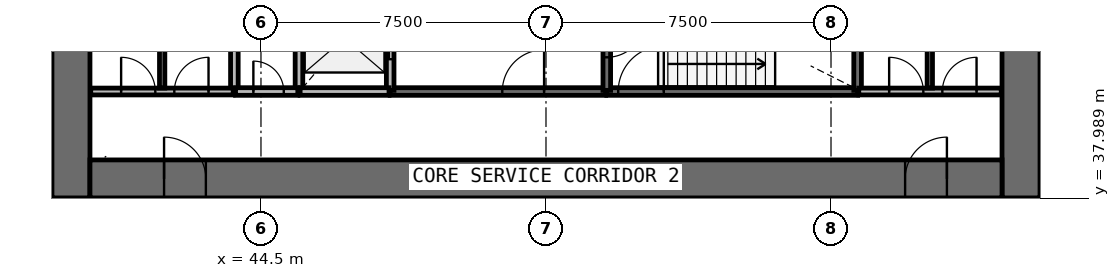
"""IFC4 building model, lengths in metres.
Left out: names, types, materials, properties, quantities, classifications, styles, units other than length and angle.
Written with IfcOpenShell. Run it as: python <this file> out.ifc"""

import sys

from ifc_helpers import new_model, si_unit, direction, frame, frame_2d, origin, place, context, subcontext, project, spatial, rectangle, extrude, source, transform, mapped, element, fill, save


model = new_model("IFC4")
c1 = context("Model", 3, precision=1e-05, world=origin(), true_north=direction((0.0, 1.0)))
c2 = subcontext(c1, "Body", "Model", "MODEL_VIEW")
j1 = project(units=[si_unit("LENGTHUNIT", "METRE"), si_unit("PLANEANGLEUNIT", "RADIAN")], contexts=[c1])
p1 = place(None, origin())
s1 = spatial("IfcSite", under=j1, at=p1, CompositionType="ELEMENT")
p2 = place(p1, origin())
s2 = spatial("IfcBuilding", under=s1, at=p2, CompositionType="ELEMENT")
p3 = place(p2, frame((0.0, 0.0, 13.8)))
s3 = spatial("IfcBuildingStorey", under=s2, at=p3, CompositionType="ELEMENT", Elevation=13.8)
p4 = place(p3, frame((64.5, 38.0, 0.0), z_axis=(0.0, 0.0, 1.0), x_axis=(0.0, 1.0, 0.0)))
e1 = element("IfcWall", 1, at=p4, inside=s3, PredefinedType="SHEAR", context=c2, shape_type="SweptSolid", body=[
    extrude(rectangle(XDim=20.0, YDim=1.0, at=frame_2d((10.0, 0.0))), origin(), (0.0, 0.0, 1.0), 4.4),
])
p5 = place(p4, frame((9.1, 0.0, 0.0)))
e2 = element("IfcOpeningElement", 2, at=p5, cuts=e1, PredefinedType="OPENING", context=c2, shape_type="SweptSolid", body=[
    extrude(rectangle(XDim=1.8, YDim=2.1, at=frame_2d((0.9, 1.05))), frame((0.0, 0.51, 0.0), z_axis=(0.0, -1.0, 0.0), x_axis=(1.0, 0.0, 0.0)), (0.0, 0.0, 1.0), 1.02),
])
p6 = place(p3, frame((39.5, 58.0, 0.0), z_axis=(0.0, 0.0, 1.0), x_axis=(0.0, -1.0, 0.0)))
e3 = element("IfcWall", 3, at=p6, inside=s3, PredefinedType="SHEAR", context=c2, shape_type="SweptSolid", body=[
    extrude(rectangle(XDim=20.0, YDim=1.0, at=frame_2d((10.0, 0.0))), origin(), (0.0, 0.0, 1.0), 4.4),
])
p7 = place(p6, frame((9.1, 0.0, 0.0)))
e4 = element("IfcOpeningElement", 4, at=p7, cuts=e3, PredefinedType="OPENING", context=c2, shape_type="SweptSolid", body=[
    extrude(rectangle(XDim=1.8, YDim=2.1, at=frame_2d((0.9, 1.05))), frame((0.0, 0.51, 0.0), z_axis=(0.0, -1.0, 0.0), x_axis=(1.0, 0.0, 0.0)), (0.0, 0.0, 1.0), 1.02),
])
p8 = place(p3, frame((40.0, 38.5, 0.0), z_axis=(0.0, 0.0, 1.0), x_axis=(1.0, 0.0, 0.0)))
e5 = element("IfcWall", 5, at=p8, inside=s3, PredefinedType="SHEAR", context=c2, shape_type="SweptSolid", body=[
    extrude(rectangle(XDim=24.0, YDim=1.0, at=frame_2d((12.0, 0.0))), origin(), (0.0, 0.0, 1.0), 4.4),
])
p9 = place(p8, frame((21.45, 0.0, 0.0)))
e6 = element("IfcOpeningElement", 6, at=p9, cuts=e5, PredefinedType="OPENING", context=c2, shape_type="SweptSolid", body=[
    extrude(rectangle(XDim=1.1, YDim=2.1, at=frame_2d((0.55, 1.05))), frame((0.0, 0.51, 0.0), z_axis=(0.0, -1.0, 0.0), x_axis=(1.0, 0.0, 0.0)), (0.0, 0.0, 1.0), 1.02),
])
p10 = place(p8, frame((1.95, 0.0, 0.0)))
e7 = element("IfcOpeningElement", 7, at=p10, cuts=e5, PredefinedType="OPENING", context=c2, shape_type="SweptSolid", body=[
    extrude(rectangle(XDim=1.1, YDim=2.1, at=frame_2d((0.55, 1.05))), frame((0.0, 0.51, 0.0), z_axis=(0.0, -1.0, 0.0), x_axis=(1.0, 0.0, 0.0)), (0.0, 0.0, 1.0), 1.02),
])
p11 = place(p3, frame((53.6, 40.8, 0.0), z_axis=(0.0, 0.0, 1.0), x_axis=(1.0, 0.0, 0.0)))
e8 = element("IfcWall", 8, at=p11, inside=s3, PredefinedType="SOLIDWALL", context=c2, shape_type="SweptSolid", body=[
    extrude(rectangle(XDim=6.6, YDim=0.2, at=frame_2d((3.3, 0.0))), origin(), (0.0, 0.0, 1.0), 4.05),
])
p12 = place(p11, frame((0.3, 0.0, 0.0)))
e9 = element("IfcOpeningElement", 9, at=p12, cuts=e8, PredefinedType="OPENING", context=c2, shape_type="SweptSolid", body=[
    extrude(rectangle(XDim=1.2, YDim=2.1, at=frame_2d((0.6, 1.05))), frame((0.0, 0.11, 0.0), z_axis=(0.0, -1.0, 0.0), x_axis=(1.0, 0.0, 0.0)), (0.0, 0.0, 1.0), 0.22),
])
p13 = place(p3, frame((47.9, 40.8, 0.0), z_axis=(0.0, 0.0, 1.0), x_axis=(1.0, 0.0, 0.0)))
e10 = element("IfcWall", 10, at=p13, inside=s3, PredefinedType="SOLIDWALL", context=c2, shape_type="SweptSolid", body=[
    extrude(rectangle(XDim=5.67, YDim=0.2, at=frame_2d((2.835, 0.0))), origin(), (0.0, 0.0, 1.0), 4.05),
])
p14 = place(p13, frame((2.95, 0.0, 0.0)))
e11 = element("IfcOpeningElement", 11, at=p14, cuts=e10, PredefinedType="OPENING", context=c2, shape_type="SweptSolid", body=[
    extrude(rectangle(XDim=1.1, YDim=2.1, at=frame_2d((0.55, 1.05))), frame((0.0, 0.11, 0.0), z_axis=(0.0, -1.0, 0.0), x_axis=(1.0, 0.0, 0.0)), (0.0, 0.0, 1.0), 0.22),
])
for number, where, z_axis, x_axis in (
    (12, (43.8, 43.6, 0.0), (0.0, 0.0, 1.0), (0.0, -1.0, 0.0)),
    (13, (45.5, 43.6, 0.0), (0.0, 0.0, 1.0), (0.0, -1.0, 0.0)),
):
    element("IfcWall", number, at=place(p3, frame(where, z_axis=z_axis, x_axis=x_axis)), inside=s3, PredefinedType="SOLIDWALL", context=c2, shape_type="SweptSolid", body=[
        extrude(rectangle(XDim=2.8, YDim=0.2, at=frame_2d((1.4, 0.0))), origin(), (0.0, 0.0, 1.0), 4.05),
    ])
p15 = place(p3, frame((47.9, 40.83, 0.0), z_axis=(0.0, 0.0, 1.0), x_axis=(0.0, 1.0, 0.0)))
e14 = element("IfcWall", 14, at=p15, inside=s3, PredefinedType="SOLIDWALL", context=c2, shape_type="SweptSolid", body=[
    extrude(rectangle(XDim=2.77, YDim=0.2, at=frame_2d((1.385, 0.0))), origin(), (0.0, 0.0, 1.0), 4.05),
])
p16 = place(p15, frame((0.82, 0.0, 0.0)))
e15 = element("IfcOpeningElement", 15, at=p16, cuts=e14, PredefinedType="OPENING", context=c2, shape_type="SweptSolid", body=[
    extrude(rectangle(XDim=1.1, YDim=2.1, at=frame_2d((0.55, 1.05))), frame((0.0, 0.11, 0.0), z_axis=(0.0, -1.0, 0.0), x_axis=(1.0, 0.0, 0.0)), (0.0, 0.0, 1.0), 0.22),
])
p17 = place(p3, frame((60.2, 40.83, 0.0), z_axis=(0.0, 0.0, 1.0), x_axis=(0.0, 1.0, 0.0)))
e16 = element("IfcWall", 16, at=p17, inside=s3, PredefinedType="SOLIDWALL", context=c2, shape_type="SweptSolid", body=[
    extrude(rectangle(XDim=2.77, YDim=0.2, at=frame_2d((1.385, 0.0))), origin(), (0.0, 0.0, 1.0), 4.05),
])
p18 = place(p3, frame((53.6, 43.6, 0.0), z_axis=(0.0, 0.0, 1.0), x_axis=(0.0, -1.0, 0.0)))
e17 = element("IfcWall", 17, at=p18, inside=s3, PredefinedType="SOLIDWALL", context=c2, shape_type="SweptSolid", body=[
    extrude(rectangle(XDim=2.77, YDim=0.2, at=frame_2d((1.385, 0.0))), origin(), (0.0, 0.0, 1.0), 4.05),
])
p19 = place(p18, frame((0.9, 0.0, 0.0)))
e18 = element("IfcOpeningElement", 18, at=p19, cuts=e17, PredefinedType="OPENING", context=c2, shape_type="SweptSolid", body=[
    extrude(rectangle(XDim=1.0, YDim=2.1, at=frame_2d((0.5, 1.05))), frame((0.0, 0.11, 0.0), z_axis=(0.0, -1.0, 0.0), x_axis=(1.0, 0.0, 0.0)), (0.0, 0.0, 1.0), 0.22),
])
p20 = place(p3, frame((45.53, 40.8, 0.0), z_axis=(0.0, 0.0, 1.0), x_axis=(1.0, 0.0, 0.0)))
e19 = element("IfcWall", 19, at=p20, inside=s3, PredefinedType="SOLIDWALL", context=c2, shape_type="SweptSolid", body=[
    extrude(rectangle(XDim=2.34, YDim=0.2, at=frame_2d((1.17, 0.0))), origin(), (0.0, 0.0, 1.0), 4.05),
])
p21 = place(p3, frame((43.83, 40.8, 0.0), z_axis=(0.0, 0.0, 1.0), x_axis=(1.0, 0.0, 0.0)))
e20 = element("IfcWall", 20, at=p21, inside=s3, PredefinedType="SOLIDWALL", context=c2, shape_type="SweptSolid", body=[
    extrude(rectangle(XDim=1.64, YDim=0.2, at=frame_2d((0.82, 0.0))), origin(), (0.0, 0.0, 1.0), 4.05),
])
p22 = place(p21, frame((0.47, 0.0, 0.0)))
e21 = element("IfcOpeningElement", 21, at=p22, cuts=e20, PredefinedType="OPENING", context=c2, shape_type="SweptSolid", body=[
    extrude(rectangle(XDim=0.8, YDim=2.1, at=frame_2d((0.4, 1.05))), frame((0.0, 0.11, 0.0), z_axis=(0.0, -1.0, 0.0), x_axis=(1.0, 0.0, 0.0)), (0.0, 0.0, 1.0), 0.22),
])
p23 = place(p3, frame((40.02, 40.8, 0.0), z_axis=(0.0, 0.0, 1.0), x_axis=(1.0, 0.0, 0.0)))
e22 = element("IfcWall", 22, at=p23, inside=s3, PredefinedType="PARTITIONING", context=c2, shape_type="SweptSolid", body=[
    extrude(rectangle(XDim=3.75, YDim=0.18, at=frame_2d((1.875, 0.0))), origin(), (0.0, 0.0, 1.0), 4.05),
])
p24 = place(p23, frame((0.8, 0.0, 0.0)))
e23 = element("IfcOpeningElement", 23, at=p24, cuts=e22, PredefinedType="OPENING", context=c2, shape_type="SweptSolid", body=[
    extrude(rectangle(XDim=0.9, YDim=2.1, at=frame_2d((0.45, 1.05))), frame((0.0, 0.1, 0.0), z_axis=(0.0, -1.0, 0.0), x_axis=(1.0, 0.0, 0.0)), (0.0, 0.0, 1.0), 0.2),
])
p25 = place(p23, frame((2.2, 0.0, 0.0)))
e24 = element("IfcOpeningElement", 24, at=p25, cuts=e22, PredefinedType="OPENING", context=c2, shape_type="SweptSolid", body=[
    extrude(rectangle(XDim=0.9, YDim=2.1, at=frame_2d((0.45, 1.05))), frame((0.0, 0.1, 0.0), z_axis=(0.0, -1.0, 0.0), x_axis=(1.0, 0.0, 0.0)), (0.0, 0.0, 1.0), 0.2),
])
p26 = place(p3, frame((60.23, 40.8, 0.0), z_axis=(0.0, 0.0, 1.0), x_axis=(1.0, 0.0, 0.0)))
e25 = element("IfcWall", 25, at=p26, inside=s3, PredefinedType="PARTITIONING", context=c2, shape_type="SweptSolid", body=[
    extrude(rectangle(XDim=3.75, YDim=0.18, at=frame_2d((1.875, 0.0))), origin(), (0.0, 0.0, 1.0), 4.05),
])
p27 = place(p26, frame((0.8, 0.0, 0.0)))
e26 = element("IfcOpeningElement", 26, at=p27, cuts=e25, PredefinedType="OPENING", context=c2, shape_type="SweptSolid", body=[
    extrude(rectangle(XDim=0.9, YDim=2.1, at=frame_2d((0.45, 1.05))), frame((0.0, 0.1, 0.0), z_axis=(0.0, -1.0, 0.0), x_axis=(1.0, 0.0, 0.0)), (0.0, 0.0, 1.0), 0.2),
])
p28 = place(p26, frame((2.2, 0.0, 0.0)))
e27 = element("IfcOpeningElement", 27, at=p28, cuts=e25, PredefinedType="OPENING", context=c2, shape_type="SweptSolid", body=[
    extrude(rectangle(XDim=0.9, YDim=2.1, at=frame_2d((0.45, 1.05))), frame((0.0, 0.1, 0.0), z_axis=(0.0, -1.0, 0.0), x_axis=(1.0, 0.0, 0.0)), (0.0, 0.0, 1.0), 0.2),
])
for number, where, z_axis, x_axis in (
    (28, (41.9, 40.89, 0.0), (0.0, 0.0, 1.0), (0.0, 1.0, 0.0)),
    (29, (62.1, 40.89, 0.0), (0.0, 0.0, 1.0), (0.0, 1.0, 0.0)),
):
    element("IfcWall", number, at=place(p3, frame(where, z_axis=z_axis, x_axis=x_axis)), inside=s3, PredefinedType="PARTITIONING", context=c2, shape_type="SweptSolid", body=[
        extrude(rectangle(XDim=2.71, YDim=0.14, at=frame_2d((1.355, 0.0))), origin(), (0.0, 0.0, 1.0), 3.25),
    ])
m1 = source(origin(), c2, "Body", "SweptSolid", [
    extrude(rectangle(XDim=1.1, YDim=2.1, at=frame_2d((0.55, 1.05))), frame((0.0, 0.025, 0.0), z_axis=(0.0, -1.0, 0.0), x_axis=(1.0, 0.0, 0.0)), (0.0, 0.0, 1.0), 0.05),
])
p29 = place(p16, origin())
e30 = element("IfcDoor", 30, at=p29, inside=s3, OperationType="DOUBLE_DOOR_SLIDING", PredefinedType="USERDEFINED", context=c2, shape_type="MappedRepresentation", body=[
    mapped(m1, transform((0.0, 0.0, 0.0), scale=1.0)),
])
fill(e15, e30)
m2 = source(origin(), c2, "Body", "SweptSolid", [
    extrude(rectangle(XDim=1.2, YDim=2.1, at=frame_2d((0.6, 1.05))), frame((0.0, 0.025, 0.0), z_axis=(0.0, -1.0, 0.0), x_axis=(1.0, 0.0, 0.0)), (0.0, 0.0, 1.0), 0.05),
])
p30 = place(p12, origin())
e31 = element("IfcDoor", 31, at=p30, inside=s3, OperationType="SINGLE_SWING_RIGHT", PredefinedType="DOOR", context=c2, shape_type="MappedRepresentation", body=[
    mapped(m2, transform((0.0, 0.0, 0.0), scale=1.0)),
])
fill(e9, e31)
m3 = source(origin(), c2, "Body", "SweptSolid", [
    extrude(rectangle(XDim=1.0, YDim=2.1, at=frame_2d((0.5, 1.05))), frame((0.0, 0.025, 0.0), z_axis=(0.0, -1.0, 0.0), x_axis=(1.0, 0.0, 0.0)), (0.0, 0.0, 1.0), 0.05),
])
p31 = place(p19, origin())
e32 = element("IfcDoor", 32, at=p31, inside=s3, OperationType="SINGLE_SWING_LEFT", PredefinedType="DOOR", context=c2, shape_type="MappedRepresentation", body=[
    mapped(m3, transform((0.0, 0.0, 0.0), scale=1.0)),
])
fill(e18, e32)
m4 = source(origin(), c2, "Body", "SweptSolid", [
    extrude(rectangle(XDim=1.1, YDim=2.1, at=frame_2d((0.55, 1.05))), frame((0.0, 0.025, 0.0), z_axis=(0.0, -1.0, 0.0), x_axis=(1.0, 0.0, 0.0)), (0.0, 0.0, 1.0), 0.05),
])
p32 = place(p14, origin())
e33 = element("IfcDoor", 33, at=p32, inside=s3, OperationType="SINGLE_SWING_RIGHT", PredefinedType="DOOR", context=c2, shape_type="MappedRepresentation", body=[
    mapped(m4, transform((0.0, 0.0, 0.0), scale=1.0)),
])
fill(e11, e33)
m5 = source(origin(), c2, "Body", "SweptSolid", [
    extrude(rectangle(XDim=0.8, YDim=2.1, at=frame_2d((0.4, 1.05))), frame((0.0, 0.025, 0.0), z_axis=(0.0, -1.0, 0.0), x_axis=(1.0, 0.0, 0.0)), (0.0, 0.0, 1.0), 0.05),
])
p33 = place(p22, origin())
e34 = element("IfcDoor", 34, at=p33, inside=s3, OperationType="SINGLE_SWING_LEFT", PredefinedType="DOOR", context=c2, shape_type="MappedRepresentation", body=[
    mapped(m5, transform((0.0, 0.0, 0.0), scale=1.0)),
])
fill(e21, e34)
m6 = source(origin(), c2, "Body", "SweptSolid", [
    extrude(rectangle(XDim=1.1, YDim=2.1, at=frame_2d((0.55, 1.05))), frame((0.0, 0.025, 0.0), z_axis=(0.0, -1.0, 0.0), x_axis=(1.0, 0.0, 0.0)), (0.0, 0.0, 1.0), 0.05),
])
p34 = place(p9, origin())
e35 = element("IfcDoor", 35, at=p34, inside=s3, OperationType="SINGLE_SWING_RIGHT", PredefinedType="DOOR", context=c2, shape_type="MappedRepresentation", body=[
    mapped(m6, transform((0.0, 0.0, 0.0), scale=1.0)),
])
fill(e6, e35)
p35 = place(p10, origin())
e36 = element("IfcDoor", 36, at=p35, inside=s3, OperationType="SINGLE_SWING_LEFT", PredefinedType="DOOR", context=c2, shape_type="MappedRepresentation", body=[
    mapped(m6, transform((0.0, 0.0, 0.0), scale=1.0)),
])
fill(e7, e36)
m7 = source(origin(), c2, "Body", "SweptSolid", [
    extrude(rectangle(XDim=0.9, YDim=2.1, at=frame_2d((0.45, 1.05))), frame((0.0, 0.025, 0.0), z_axis=(0.0, -1.0, 0.0), x_axis=(1.0, 0.0, 0.0)), (0.0, 0.0, 1.0), 0.05),
])
p36 = place(p24, origin())
e37 = element("IfcDoor", 37, at=p36, inside=s3, OperationType="SINGLE_SWING_LEFT", PredefinedType="DOOR", context=c2, shape_type="MappedRepresentation", body=[
    mapped(m7, transform((0.0, 0.0, 0.0), scale=1.0)),
])
fill(e23, e37)
p37 = place(p25, origin())
e38 = element("IfcDoor", 38, at=p37, inside=s3, OperationType="SINGLE_SWING_RIGHT", PredefinedType="DOOR", context=c2, shape_type="MappedRepresentation", body=[
    mapped(m7, transform((0.0, 0.0, 0.0), scale=1.0)),
])
fill(e24, e38)
p38 = place(p27, origin())
e39 = element("IfcDoor", 39, at=p38, inside=s3, OperationType="SINGLE_SWING_LEFT", PredefinedType="DOOR", context=c2, shape_type="MappedRepresentation", body=[
    mapped(m7, transform((0.0, 0.0, 0.0), scale=1.0)),
])
fill(e26, e39)
p39 = place(p28, origin())
e40 = element("IfcDoor", 40, at=p39, inside=s3, OperationType="SINGLE_SWING_RIGHT", PredefinedType="DOOR", context=c2, shape_type="MappedRepresentation", body=[
    mapped(m7, transform((0.0, 0.0, 0.0), scale=1.0)),
])
fill(e27, e40)
save(model, sys.argv[1])
